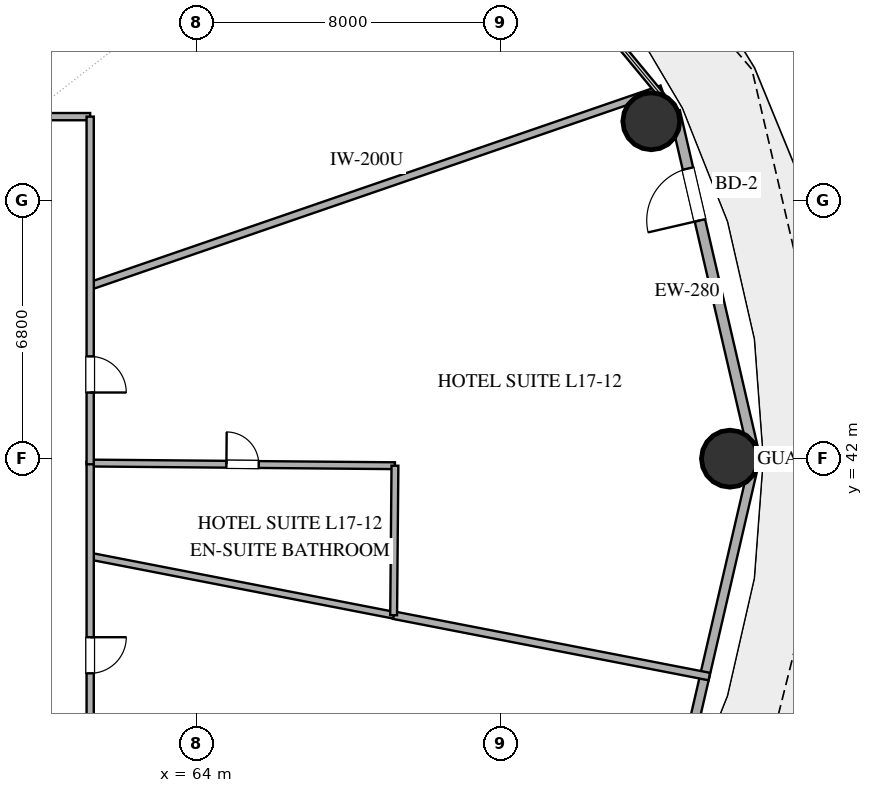
"""IFC4 building model, lengths in metres.
Left out: names, types, materials, properties, quantities, classifications, styles, units other than length and angle.
Written with IfcOpenShell. Run it as: python <this file> out.ifc"""

import sys

from ifc_helpers import new_model, si_unit, direction, frame, frame_2d, origin, origin_2d, place, context, subcontext, project, spatial, rectangle, hollow_circle, extrude, element, fill, save


model = new_model("IFC4")
c1 = context("Model", 3, precision=1e-05, world=origin(), true_north=direction((0.0, 1.0)))
c2 = subcontext(c1, "Body", "Model", "MODEL_VIEW")
j1 = project(units=[si_unit("LENGTHUNIT", "METRE"), si_unit("PLANEANGLEUNIT", "RADIAN")], contexts=[c1])
p1 = place(None, origin())
s1 = spatial("IfcSite", under=j1, at=p1, CompositionType="ELEMENT")
p2 = place(p1, origin())
s2 = spatial("IfcBuilding", under=s1, at=p2, CompositionType="ELEMENT")
p3 = place(p2, frame((0.0, 0.0, 71.4)))
s3 = spatial("IfcBuildingStorey", under=s2, at=p3, CompositionType="ELEMENT", Elevation=71.4)
for number, where, z_axis, x_axis in (
    (1, (78.035, 42.0, 0.0), (0.0, 0.0, 1.0), (1.0, 0.0, 0.0)),
    (2, (75.966, 50.878, 0.0), (0.0, 0.0, 1.0), (1.0, 0.0, 0.0)),
):
    element("IfcColumn", number, at=place(p3, frame(where, z_axis=z_axis, x_axis=x_axis)), inside=s3, PredefinedType="COLUMN", context=c2, shape_type="SweptSolid", body=[
        extrude(hollow_circle(Radius=0.75, WallThickness=0.04, at=origin_2d()), origin(), (0.0, 0.0, 1.0), 3.38),
    ])
p4 = place(p3, frame((78.696, 42.0, 0.0), z_axis=(0.0, 0.0, 1.0), x_axis=(-0.225454452941, 0.974253709076, 0.0)))
e3 = element("IfcWall", 3, at=p4, inside=s3, PredefinedType="SOLIDWALL", context=c2, shape_type="SweptSolid", body=[
    extrude(rectangle(XDim=9.38, YDim=0.28, at=frame_2d((4.69, 0.0))), origin(), (0.0, 0.0, 1.0), 3.38),
])
p5 = place(p4, frame((6.435, 0.0, 0.0)))
e4 = element("IfcOpeningElement", 4, at=p5, cuts=e3, PredefinedType="OPENING", context=c2, shape_type="SweptSolid", body=[
    extrude(rectangle(XDim=1.4, YDim=2.2, at=frame_2d((0.7, 1.1))), frame((0.0, 0.15, 0.0), z_axis=(0.0, -1.0, 0.0), x_axis=(1.0, 0.0, 0.0)), (0.0, 0.0, 1.0), 0.3),
])
p6 = place(p3, frame((76.581, 32.862, 0.0), z_axis=(0.0, 0.0, 1.0), x_axis=(0.225454452941, 0.974253709076, 0.0)))
e5 = element("IfcWall", 5, at=p6, inside=s3, PredefinedType="SOLIDWALL", context=c2, shape_type="SweptSolid", body=[
    extrude(rectangle(XDim=9.38, YDim=0.25, at=frame_2d((4.69, 0.0))), origin(), (0.0, 0.0, 1.0), 3.38),
])
p7 = place(p3, frame((61.2, 46.545, 0.0), z_axis=(0.0, 0.0, 1.0), x_axis=(0.945518845989, 0.325567369186, 0.0)))
e6 = element("IfcWall", 6, at=p7, inside=s3, PredefinedType="PARTITIONING", context=c2, shape_type="SweptSolid", body=[
    extrude(rectangle(XDim=15.909, YDim=0.2, at=frame_2d((7.955, 0.0))), origin(), (0.0, 0.0, 1.0), 2.74),
])
p8 = place(p3, frame((77.492, 36.267, 0.0), z_axis=(0.0, 0.0, 1.0), x_axis=(-0.981626048747, 0.190814832812, 0.0)))
e7 = element("IfcWall", 7, at=p8, inside=s3, PredefinedType="PARTITIONING", context=c2, shape_type="SweptSolid", body=[
    extrude(rectangle(XDim=8.462, YDim=0.2, at=frame_2d((4.231, 0.0))), origin(), (0.0, 0.0, 1.0), 2.74),
])
p9 = place(p3, frame((55.823, 51.0, 0.0), z_axis=(0.0, 0.0, 1.0), x_axis=(0.656066321773, 0.754703240641, 0.0)))
e8 = element("IfcWall", 8, at=p9, inside=s3, PredefinedType="PARTITIONING", context=c2, shape_type="SweptSolid", body=[
    extrude(rectangle(XDim=14.091, YDim=0.2, at=frame_2d((7.045, 0.0))), origin(), (0.0, 0.0, 1.0), 2.74),
])
p10 = place(p3, frame((69.185, 37.882, 0.0), z_axis=(0.0, 0.0, 1.0), x_axis=(-0.981631630513, 0.190786115787, 0.0)))
e9 = element("IfcWall", 9, at=p10, inside=s3, PredefinedType="PLUMBINGWALL", context=c2, shape_type="SweptSolid", body=[
    extrude(rectangle(XDim=8.135, YDim=0.18, at=frame_2d((4.067, 0.0))), origin(), (0.0, 0.0, 1.0), 2.74),
])
p11 = place(p3, frame((61.2, 41.885, 0.0), z_axis=(0.0, 0.0, 1.0), x_axis=(0.999961832732, -0.008736880358, 0.0)))
e10 = element("IfcWall", 10, at=p11, inside=s3, PredefinedType="PLUMBINGWALL", context=c2, shape_type="SweptSolid", body=[
    extrude(rectangle(XDim=8.02, YDim=0.18, at=frame_2d((4.01, 0.0))), origin(), (0.0, 0.0, 1.0), 2.74),
])
p12 = place(p11, frame((3.585, 0.0, 0.0)))
e11 = element("IfcOpeningElement", 11, at=p12, cuts=e10, PredefinedType="OPENING", context=c2, shape_type="SweptSolid", body=[
    extrude(rectangle(XDim=0.85, YDim=2.1, at=frame_2d((0.425, 1.05))), frame((0.0, 0.1, 0.0), z_axis=(0.0, -1.0, 0.0), x_axis=(1.0, 0.0, 0.0)), (0.0, 0.0, 1.0), 0.2),
])
p13 = place(p3, frame((53.264, 51.0, 0.0), z_axis=(0.0, 0.0, 1.0), x_axis=(1.0, 0.0, 0.0)))
e12 = element("IfcWall", 12, at=p13, inside=s3, PredefinedType="PARTITIONING", context=c2, shape_type="SweptSolid", body=[
    extrude(rectangle(XDim=7.936, YDim=0.19, at=frame_2d((3.968, 0.0))), origin(), (0.0, 0.0, 1.0), 2.74),
])
p14 = place(p13, frame((4.726, 0.0, 0.0)))
e13 = element("IfcOpeningElement", 13, at=p14, cuts=e12, PredefinedType="OPENING", context=c2, shape_type="SweptSolid", body=[
    extrude(rectangle(XDim=1.0, YDim=2.2, at=frame_2d((0.5, 1.1))), frame((0.0, 0.105, 0.0), z_axis=(0.0, -1.0, 0.0), x_axis=(1.0, 0.0, 0.0)), (0.0, 0.0, 1.0), 0.21),
])
p15 = place(p3, frame((61.2, 41.917, 0.0), z_axis=(0.0, 0.0, 1.0), x_axis=(0.0, -1.0, 0.0)))
e14 = element("IfcWall", 14, at=p15, inside=s3, PredefinedType="PARTITIONING", context=c2, shape_type="SweptSolid", body=[
    extrude(rectangle(XDim=8.917, YDim=0.19, at=frame_2d((4.458, 0.0))), origin(), (0.0, 0.0, 1.0), 2.74),
])
p16 = place(p15, frame((4.615, 0.0, 0.0)))
e15 = element("IfcOpeningElement", 15, at=p16, cuts=e14, PredefinedType="OPENING", context=c2, shape_type="SweptSolid", body=[
    extrude(rectangle(XDim=0.95, YDim=2.15, at=frame_2d((0.475, 1.075))), frame((0.0, 0.105, 0.0), z_axis=(0.0, -1.0, 0.0), x_axis=(1.0, 0.0, 0.0)), (0.0, 0.0, 1.0), 0.21),
])
p17 = place(p3, frame((61.2, 51.0, 0.0), z_axis=(0.0, 0.0, 1.0), x_axis=(0.0, -1.0, 0.0)))
e16 = element("IfcWall", 16, at=p17, inside=s3, PredefinedType="PARTITIONING", context=c2, shape_type="SweptSolid", body=[
    extrude(rectangle(XDim=9.147, YDim=0.19, at=frame_2d((4.574, 0.0))), origin(), (0.0, 0.0, 1.0), 2.74),
])
p18 = place(p17, frame((6.309, 0.0, 0.0)))
e17 = element("IfcOpeningElement", 17, at=p18, cuts=e16, PredefinedType="OPENING", context=c2, shape_type="SweptSolid", body=[
    extrude(rectangle(XDim=0.95, YDim=2.15, at=frame_2d((0.475, 1.075))), frame((0.0, 0.105, 0.0), z_axis=(0.0, -1.0, 0.0), x_axis=(1.0, 0.0, 0.0)), (0.0, 0.0, 1.0), 0.21),
])
p19 = place(p3, frame((69.219, 41.815, 0.0), z_axis=(0.0, 0.0, 1.0), x_axis=(-0.008691005249, -0.999962232501, 0.0)))
e18 = element("IfcWall", 18, at=p19, inside=s3, PredefinedType="PLUMBINGWALL", context=c2, shape_type="SweptSolid", body=[
    extrude(rectangle(XDim=3.933, YDim=0.18, at=frame_2d((1.966, 0.0))), origin(), (0.0, 0.0, 1.0), 2.74),
])
p20 = place(p5, origin())
e19 = element("IfcDoor", 19, at=p20, inside=s3, OperationType="SINGLE_SWING_LEFT", PredefinedType="DOOR", context=c2, shape_type="SweptSolid", body=[
    extrude(rectangle(XDim=1.4, YDim=2.2, at=frame_2d((0.7, 1.1))), frame((0.0, 0.025, 0.0), z_axis=(0.0, -1.0, 0.0), x_axis=(1.0, 0.0, 0.0)), (0.0, 0.0, 1.0), 0.05),
])
fill(e4, e19)
p21 = place(p12, origin())
e20 = element("IfcDoor", 20, at=p21, inside=s3, OperationType="SINGLE_SWING_LEFT", PredefinedType="DOOR", context=c2, shape_type="SweptSolid", body=[
    extrude(rectangle(XDim=0.85, YDim=2.1, at=frame_2d((0.425, 1.05))), frame((0.0, 0.025, 0.0), z_axis=(0.0, -1.0, 0.0), x_axis=(1.0, 0.0, 0.0)), (0.0, 0.0, 1.0), 0.05),
])
fill(e11, e20)
p22 = place(p16, origin())
e21 = element("IfcDoor", 21, at=p22, inside=s3, OperationType="SINGLE_SWING_LEFT", PredefinedType="DOOR", context=c2, shape_type="SweptSolid", body=[
    extrude(rectangle(XDim=0.95, YDim=2.15, at=frame_2d((0.475, 1.075))), frame((0.0, 0.025, 0.0), z_axis=(0.0, -1.0, 0.0), x_axis=(1.0, 0.0, 0.0)), (0.0, 0.0, 1.0), 0.05),
])
fill(e15, e21)
p23 = place(p18, origin())
e22 = element("IfcDoor", 22, at=p23, inside=s3, OperationType="SINGLE_SWING_RIGHT", PredefinedType="DOOR", context=c2, shape_type="SweptSolid", body=[
    extrude(rectangle(XDim=0.95, YDim=2.15, at=frame_2d((0.475, 1.075))), frame((0.0, 0.025, 0.0), z_axis=(0.0, -1.0, 0.0), x_axis=(1.0, 0.0, 0.0)), (0.0, 0.0, 1.0), 0.05),
])
fill(e17, e22)
save(model, sys.argv[1])
